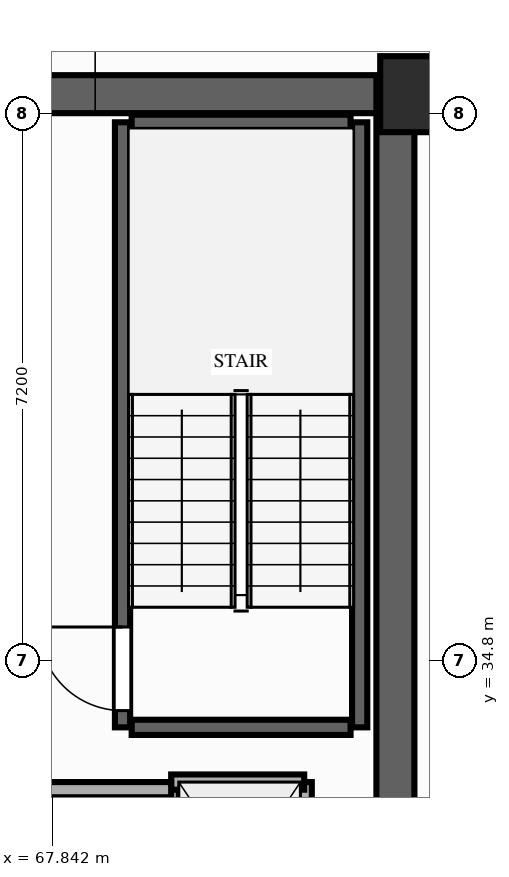
"""IFC4 building model, lengths in metres.
Left out: names, types, materials, properties, quantities, classifications, styles, units other than length and angle.
Written with IfcOpenShell. Run it as: python <this file> out.ifc"""

import sys

from ifc_helpers import new_model, si_unit, direction, frame, frame_2d, origin, origin_2d, place, context, subcontext, project, spatial, rectangle, extrude, element, fill, save


model = new_model("IFC4")
c1 = context("Model", 3, precision=1e-05, world=origin(), true_north=direction((0.0, 1.0)))
c2 = subcontext(c1, "Body", "Model", "MODEL_VIEW")
j1 = project(units=[si_unit("LENGTHUNIT", "METRE"), si_unit("PLANEANGLEUNIT", "RADIAN")], contexts=[c1])
p1 = place(None, origin())
s1 = spatial("IfcSite", under=j1, at=p1, CompositionType="ELEMENT")
p2 = place(p1, origin())
s2 = spatial("IfcBuilding", under=s1, at=p2, CompositionType="ELEMENT")
p3 = place(p2, frame((0.0, 0.0, 75.6)))
s3 = spatial("IfcBuildingStorey", under=s2, at=p3, CompositionType="ELEMENT", Elevation=75.6)
p4 = place(p3, frame((72.65, 42.25, 0.0), z_axis=(0.0, 0.0, 1.0), x_axis=(1.0, 0.0, 0.0)))
e1 = element("IfcColumn", 1, at=p4, inside=s3, PredefinedType="COLUMN", context=c2, shape_type="SweptSolid", body=[
    extrude(rectangle(XDim=1.0, YDim=1.0, at=origin_2d()), origin(), (0.0, 0.0, 1.0), 3.8),
])
p5 = place(p3, frame((72.35, 22.0, 0.0), z_axis=(0.0, 0.0, 1.0), x_axis=(0.0, 1.0, 0.0)))
e2 = element("IfcWall", 2, at=p5, inside=s3, PredefinedType="SHEAR", context=c2, shape_type="SweptSolid", body=[
    extrude(rectangle(XDim=20.25, YDim=0.5, at=frame_2d((10.125, 0.0))), origin(), (0.0, 0.0, 1.0), 3.56),
])
p6 = place(p3, frame((64.6, 42.25, 0.0), z_axis=(0.0, 0.0, 1.0), x_axis=(1.0, 0.0, 0.0)))
e3 = element("IfcWall", 3, at=p6, inside=s3, PredefinedType="SHEAR", context=c2, shape_type="SweptSolid", body=[
    extrude(rectangle(XDim=7.5, YDim=0.5, at=frame_2d((3.75, 0.0))), origin(), (0.0, 0.0, 1.0), 3.56),
])
p7 = place(p3, frame((68.76, 33.92, 0.0), z_axis=(0.0, 0.0, 1.0), x_axis=(0.0, 1.0, 0.0)))
e4 = element("IfcWall", 4, at=p7, inside=s3, PredefinedType="SHEAR", context=c2, shape_type="SweptSolid", body=[
    extrude(rectangle(XDim=7.96, YDim=0.2, at=frame_2d((3.98, 0.0))), origin(), (0.0, 0.0, 1.0), 3.56),
])
p8 = place(p7, frame((0.22, 0.0, 0.0)))
e5 = element("IfcOpeningElement", 5, at=p8, cuts=e4, PredefinedType="OPENING", context=c2, shape_type="SweptSolid", body=[
    extrude(rectangle(XDim=1.1, YDim=2.15, at=frame_2d((0.55, 1.075))), frame((0.0, 0.11, 0.0), z_axis=(0.0, -1.0, 0.0), x_axis=(1.0, 0.0, 0.0)), (0.0, 0.0, 1.0), 0.22),
])
p9 = place(p3, frame((71.88, 33.92, 0.0), z_axis=(0.0, 0.0, 1.0), x_axis=(0.0, 1.0, 0.0)))
e6 = element("IfcWall", 6, at=p9, inside=s3, PredefinedType="SHEAR", context=c2, shape_type="SweptSolid", body=[
    extrude(rectangle(XDim=7.96, YDim=0.2, at=frame_2d((3.98, 0.0))), origin(), (0.0, 0.0, 1.0), 3.56),
])
for number, where, z_axis, x_axis in (
    (7, (68.88, 41.88, 0.0), (0.0, 0.0, 1.0), (1.0, 0.0, 0.0)),
    (8, (68.88, 33.92, 0.0), (0.0, 0.0, 1.0), (1.0, 0.0, 0.0)),
):
    element("IfcWall", number, at=place(p3, frame(where, z_axis=z_axis, x_axis=x_axis)), inside=s3, PredefinedType="SHEAR", context=c2, shape_type="SweptSolid", body=[
        extrude(rectangle(XDim=2.88, YDim=0.2, at=frame_2d((1.44, 0.0))), origin(), (0.0, 0.0, 1.0), 3.56),
    ])
p10 = place(p3, frame((69.4, 30.75, 0.0), z_axis=(0.0, 0.0, 1.0), x_axis=(0.0, 1.0, 0.0)))
e9 = element("IfcWall", 9, at=p10, inside=s3, PredefinedType="MOVABLE", context=c2, shape_type="SweptSolid", body=[
    extrude(rectangle(XDim=2.45, YDim=0.2, at=frame_2d((1.225, 0.0))), origin(), (0.0, 0.0, 1.0), 3.56),
])
p11 = place(p10, frame((0.65, 0.0, 0.0)))
e10 = element("IfcOpeningElement", 10, at=p11, cuts=e9, PredefinedType="OPENING", context=c2, shape_type="SweptSolid", body=[
    extrude(rectangle(XDim=1.05, YDim=2.15, at=frame_2d((0.525, 1.075))), frame((0.0, 0.11, 0.0), z_axis=(0.0, -1.0, 0.0), x_axis=(1.0, 0.0, 0.0)), (0.0, 0.0, 1.0), 0.22),
])
p12 = place(p3, frame((71.15, 30.75, 0.0), z_axis=(0.0, 0.0, 1.0), x_axis=(0.0, 1.0, 0.0)))
e11 = element("IfcWall", 11, at=p12, inside=s3, PredefinedType="MOVABLE", context=c2, shape_type="SweptSolid", body=[
    extrude(rectangle(XDim=2.45, YDim=0.2, at=frame_2d((1.225, 0.0))), origin(), (0.0, 0.0, 1.0), 3.56),
])
p13 = place(p3, frame((69.4, 33.2, 0.0), z_axis=(0.0, 0.0, 1.0), x_axis=(1.0, 0.0, 0.0)))
e12 = element("IfcWall", 12, at=p13, inside=s3, PredefinedType="MOVABLE", context=c2, shape_type="SweptSolid", body=[
    extrude(rectangle(XDim=1.75, YDim=0.2, at=frame_2d((0.875, 0.0))), origin(), (0.0, 0.0, 1.0), 3.56),
])
p14 = place(p3, frame((65.8, 33.1, 0.0), z_axis=(0.0, 0.0, 1.0), x_axis=(1.0, 0.0, 0.0)))
e13 = element("IfcWall", 13, at=p14, inside=s3, PredefinedType="PARTITIONING", context=c2, shape_type="SweptSolid", body=[
    extrude(rectangle(XDim=3.6, YDim=0.2, at=frame_2d((1.8, 0.0))), origin(), (0.0, 0.0, 1.0), 3.56),
])
p15 = place(p8, origin())
e14 = element("IfcDoor", 14, at=p15, inside=s3, OperationType="SINGLE_SWING_RIGHT", PredefinedType="DOOR", context=c2, shape_type="SweptSolid", body=[
    extrude(rectangle(XDim=1.1, YDim=2.15, at=frame_2d((0.55, 1.075))), frame((0.0, 0.025, 0.0), z_axis=(0.0, -1.0, 0.0), x_axis=(1.0, 0.0, 0.0)), (0.0, 0.0, 1.0), 0.05),
])
fill(e5, e14)
save(model, sys.argv[1])
